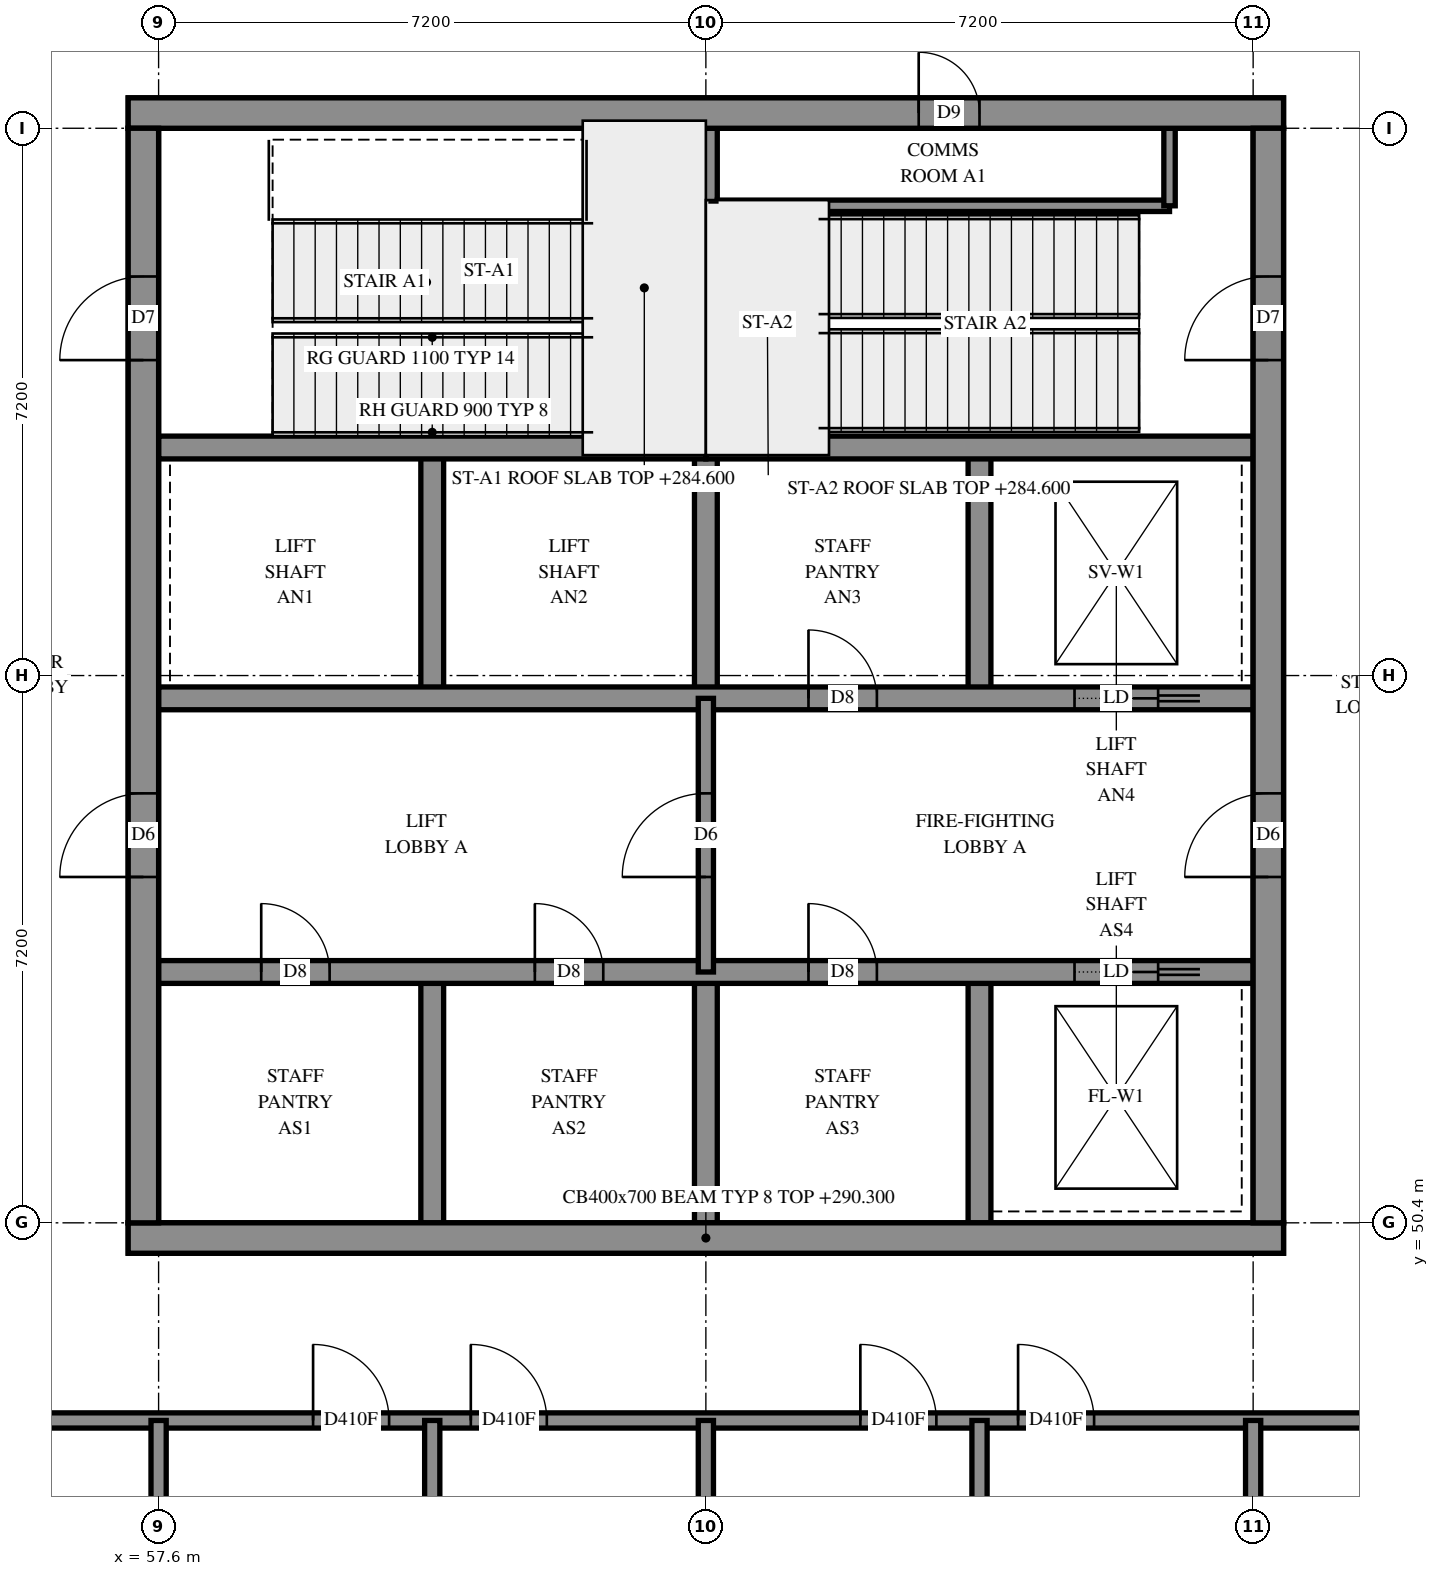
"""IFC4 building model, lengths in metres.
Left out: names, types, materials, properties, quantities, classifications, styles, units other than length and angle.
Written with IfcOpenShell. Run it as: python <this file> out.ifc"""

import sys

from ifc_helpers import new_model, si_unit, direction, frame, frame_2d, origin, place, context, subcontext, project, spatial, rectangle, extrude, element, fill, save


model = new_model("IFC4")
c1 = context("Model", 3, precision=1e-05, world=origin(), true_north=direction((0.0, 1.0)))
c2 = subcontext(c1, "Body", "Model", "MODEL_VIEW")
j1 = project(units=[si_unit("LENGTHUNIT", "METRE"), si_unit("PLANEANGLEUNIT", "RADIAN")], contexts=[c1])
p1 = place(None, origin())
s1 = spatial("IfcSite", under=j1, at=p1, CompositionType="ELEMENT")
p2 = place(p1, origin())
s2 = spatial("IfcBuilding", under=s1, at=p2, CompositionType="ELEMENT")
p3 = place(p2, frame((0.0, 0.0, 284.6)))
s3 = spatial("IfcBuildingStorey", under=s2, at=p3, CompositionType="ELEMENT", Elevation=284.6)
p4 = place(p3, frame((57.2, 50.2, -0.3), z_axis=(0.0, 0.0, 1.0), x_axis=(1.0, 0.0, 0.0)))
e1 = element("IfcWall", 1, at=p4, inside=s3, PredefinedType="SHEAR", context=c2, shape_type="SweptSolid", body=[
    extrude(rectangle(XDim=15.2, YDim=0.4, at=frame_2d((7.6, 0.0))), origin(), (0.0, 0.0, 1.0), 5.3),
])
p5 = place(p3, frame((57.2, 65.0, -0.3), z_axis=(0.0, 0.0, 1.0), x_axis=(1.0, 0.0, 0.0)))
e2 = element("IfcWall", 2, at=p5, inside=s3, PredefinedType="SHEAR", context=c2, shape_type="SweptSolid", body=[
    extrude(rectangle(XDim=15.2, YDim=0.4, at=frame_2d((7.6, 0.0))), origin(), (0.0, 0.0, 1.0), 5.3),
])
p6 = place(p5, frame((10.4, 0.0, 0.3)))
e3 = element("IfcOpeningElement", 3, at=p6, cuts=e2, PredefinedType="OPENING", context=c2, shape_type="SweptSolid", body=[
    extrude(rectangle(XDim=0.8, YDim=2.1, at=frame_2d((0.4, 1.05))), frame((0.0, 0.21, 0.0), z_axis=(0.0, -1.0, 0.0), x_axis=(1.0, 0.0, 0.0)), (0.0, 0.0, 1.0), 0.42),
])
p7 = place(p3, frame((57.4, 50.4, -0.3), z_axis=(0.0, 0.0, 1.0), x_axis=(0.0, 1.0, 0.0)))
e4 = element("IfcWall", 4, at=p7, inside=s3, PredefinedType="SHEAR", context=c2, shape_type="SweptSolid", body=[
    extrude(rectangle(XDim=14.4, YDim=0.4, at=frame_2d((7.2, 0.0))), origin(), (0.0, 0.0, 1.0), 5.3),
])
p8 = place(p7, frame((4.55, 0.0, 0.3)))
e5 = element("IfcOpeningElement", 5, at=p8, cuts=e4, PredefinedType="OPENING", context=c2, shape_type="SweptSolid", body=[
    extrude(rectangle(XDim=1.1, YDim=2.1, at=frame_2d((0.55, 1.05))), frame((0.0, 0.21, 0.0), z_axis=(0.0, -1.0, 0.0), x_axis=(1.0, 0.0, 0.0)), (0.0, 0.0, 1.0), 0.42),
])
p9 = place(p7, frame((11.35, 0.0, 0.3)))
e6 = element("IfcOpeningElement", 6, at=p9, cuts=e4, PredefinedType="OPENING", context=c2, shape_type="SweptSolid", body=[
    extrude(rectangle(XDim=1.1, YDim=2.1, at=frame_2d((0.55, 1.05))), frame((0.0, 0.21, 0.0), z_axis=(0.0, -1.0, 0.0), x_axis=(1.0, 0.0, 0.0)), (0.0, 0.0, 1.0), 0.42),
])
p10 = place(p3, frame((72.2, 50.4, -0.3), z_axis=(0.0, 0.0, 1.0), x_axis=(0.0, 1.0, 0.0)))
e7 = element("IfcWall", 7, at=p10, inside=s3, PredefinedType="SHEAR", context=c2, shape_type="SweptSolid", body=[
    extrude(rectangle(XDim=14.4, YDim=0.4, at=frame_2d((7.2, 0.0))), origin(), (0.0, 0.0, 1.0), 5.3),
])
p11 = place(p10, frame((4.55, 0.0, 0.3)))
e8 = element("IfcOpeningElement", 8, at=p11, cuts=e7, PredefinedType="OPENING", context=c2, shape_type="SweptSolid", body=[
    extrude(rectangle(XDim=1.1, YDim=2.1, at=frame_2d((0.55, 1.05))), frame((0.0, 0.21, 0.0), z_axis=(0.0, -1.0, 0.0), x_axis=(1.0, 0.0, 0.0)), (0.0, 0.0, 1.0), 0.42),
])
p12 = place(p10, frame((11.35, 0.0, 0.3)))
e9 = element("IfcOpeningElement", 9, at=p12, cuts=e7, PredefinedType="OPENING", context=c2, shape_type="SweptSolid", body=[
    extrude(rectangle(XDim=1.1, YDim=2.1, at=frame_2d((0.55, 1.05))), frame((0.0, 0.21, 0.0), z_axis=(0.0, -1.0, 0.0), x_axis=(1.0, 0.0, 0.0)), (0.0, 0.0, 1.0), 0.42),
])
for number, where, z_axis, x_axis in (
    (10, (61.2, 50.4, 0.0), (0.0, 0.0, 1.0), (0.0, 1.0, 0.0)),
    (11, (61.2, 57.3, 0.0), (0.0, 0.0, 1.0), (0.0, 1.0, 0.0)),
    (12, (64.8, 50.4, 0.0), (0.0, 0.0, 1.0), (0.0, 1.0, 0.0)),
    (13, (64.8, 57.3, 0.0), (0.0, 0.0, 1.0), (0.0, 1.0, 0.0)),
    (14, (68.4, 50.4, 0.0), (0.0, 0.0, 1.0), (0.0, 1.0, 0.0)),
    (15, (68.4, 57.3, 0.0), (0.0, 0.0, 1.0), (0.0, 1.0, 0.0)),
):
    element("IfcWall", number, at=place(p3, frame(where, z_axis=z_axis, x_axis=x_axis)), inside=s3, PredefinedType="SOLIDWALL", context=c2, shape_type="SweptSolid", body=[
        extrude(rectangle(XDim=3.3, YDim=0.3, at=frame_2d((1.65, 0.0))), origin(), (0.0, 0.0, 1.0), 5.7),
    ])
p13 = place(p3, frame((57.6, 53.7, 0.0), z_axis=(0.0, 0.0, 1.0), x_axis=(1.0, 0.0, 0.0)))
e16 = element("IfcWall", 16, at=p13, inside=s3, PredefinedType="SOLIDWALL", context=c2, shape_type="SweptSolid", body=[
    extrude(rectangle(XDim=14.4, YDim=0.3, at=frame_2d((7.2, 0.0))), origin(), (0.0, 0.0, 1.0), 5.7),
])
p14 = place(p13, frame((1.35, 0.0, 0.0)))
e17 = element("IfcOpeningElement", 17, at=p14, cuts=e16, PredefinedType="OPENING", context=c2, shape_type="SweptSolid", body=[
    extrude(rectangle(XDim=0.9, YDim=2.1, at=frame_2d((0.45, 1.05))), frame((0.0, 0.16, 0.0), z_axis=(0.0, -1.0, 0.0), x_axis=(1.0, 0.0, 0.0)), (0.0, 0.0, 1.0), 0.32),
])
p15 = place(p13, frame((4.95, 0.0, 0.0)))
e18 = element("IfcOpeningElement", 18, at=p15, cuts=e16, PredefinedType="OPENING", context=c2, shape_type="SweptSolid", body=[
    extrude(rectangle(XDim=0.9, YDim=2.1, at=frame_2d((0.45, 1.05))), frame((0.0, 0.16, 0.0), z_axis=(0.0, -1.0, 0.0), x_axis=(1.0, 0.0, 0.0)), (0.0, 0.0, 1.0), 0.32),
])
p16 = place(p13, frame((8.55, 0.0, 0.0)))
e19 = element("IfcOpeningElement", 19, at=p16, cuts=e16, PredefinedType="OPENING", context=c2, shape_type="SweptSolid", body=[
    extrude(rectangle(XDim=0.9, YDim=2.1, at=frame_2d((0.45, 1.05))), frame((0.0, 0.16, 0.0), z_axis=(0.0, -1.0, 0.0), x_axis=(1.0, 0.0, 0.0)), (0.0, 0.0, 1.0), 0.32),
])
p17 = place(p13, frame((12.05, 0.0, 0.0)))
e20 = element("IfcOpeningElement", 20, at=p17, cuts=e16, PredefinedType="OPENING", context=c2, shape_type="SweptSolid", body=[
    extrude(rectangle(XDim=1.1, YDim=2.1, at=frame_2d((0.55, 1.05))), frame((0.0, 0.16, 0.0), z_axis=(0.0, -1.0, 0.0), x_axis=(1.0, 0.0, 0.0)), (0.0, 0.0, 1.0), 0.32),
])
p18 = place(p3, frame((57.6, 57.3, 0.0), z_axis=(0.0, 0.0, 1.0), x_axis=(1.0, 0.0, 0.0)))
e21 = element("IfcWall", 21, at=p18, inside=s3, PredefinedType="SOLIDWALL", context=c2, shape_type="SweptSolid", body=[
    extrude(rectangle(XDim=14.4, YDim=0.3, at=frame_2d((7.2, 0.0))), origin(), (0.0, 0.0, 1.0), 5.7),
])
p19 = place(p18, frame((8.55, 0.0, 0.0)))
e22 = element("IfcOpeningElement", 22, at=p19, cuts=e21, PredefinedType="OPENING", context=c2, shape_type="SweptSolid", body=[
    extrude(rectangle(XDim=0.9, YDim=2.1, at=frame_2d((0.45, 1.05))), frame((0.0, 0.16, 0.0), z_axis=(0.0, -1.0, 0.0), x_axis=(1.0, 0.0, 0.0)), (0.0, 0.0, 1.0), 0.32),
])
p20 = place(p18, frame((12.05, 0.0, 0.0)))
e23 = element("IfcOpeningElement", 23, at=p20, cuts=e21, PredefinedType="OPENING", context=c2, shape_type="SweptSolid", body=[
    extrude(rectangle(XDim=1.1, YDim=2.1, at=frame_2d((0.55, 1.05))), frame((0.0, 0.16, 0.0), z_axis=(0.0, -1.0, 0.0), x_axis=(1.0, 0.0, 0.0)), (0.0, 0.0, 1.0), 0.32),
])
for number, where, z_axis, x_axis in (
    (24, (57.6, 60.6, 0.0), (0.0, 0.0, 1.0), (1.0, 0.0, 0.0)),
    (25, (64.8, 60.6, 0.0), (0.0, 0.0, 1.0), (1.0, 0.0, 0.0)),
):
    element("IfcWall", number, at=place(p3, frame(where, z_axis=z_axis, x_axis=x_axis)), inside=s3, PredefinedType="SOLIDWALL", context=c2, shape_type="SweptSolid", body=[
        extrude(rectangle(XDim=7.2, YDim=0.3, at=frame_2d((3.6, 0.0))), origin(), (0.0, 0.0, 1.0), 5.7),
    ])
p21 = place(p3, frame((64.8, 60.6, 0.0), z_axis=(0.0, 0.0, 1.0), x_axis=(0.0, 1.0, 0.0)))
e26 = element("IfcWall", 26, at=p21, inside=s3, PredefinedType="SOLIDWALL", context=c2, shape_type="SweptSolid", body=[
    extrude(rectangle(XDim=4.2, YDim=0.3, at=frame_2d((2.1, 0.0))), origin(), (0.0, 0.0, 1.0), 5.7),
])
p22 = place(p3, frame((64.95, 63.78, 0.0), z_axis=(0.0, 0.0, 1.0), x_axis=(1.0, 0.0, 0.0)))
e27 = element("IfcWall", 27, at=p22, inside=s3, PredefinedType="PARTITIONING", context=c2, shape_type="SweptSolid", body=[
    extrude(rectangle(XDim=5.95, YDim=0.15, at=frame_2d((2.975, 0.0))), origin(), (0.0, 0.0, 1.0), 5.7),
])
p23 = place(p3, frame((70.9, 63.78, 0.0), z_axis=(0.0, 0.0, 1.0), x_axis=(0.0, 1.0, 0.0)))
e28 = element("IfcWall", 28, at=p23, inside=s3, PredefinedType="PARTITIONING", context=c2, shape_type="SweptSolid", body=[
    extrude(rectangle(XDim=1.02, YDim=0.15, at=frame_2d((0.51, 0.0))), origin(), (0.0, 0.0, 1.0), 5.7),
])
p24 = place(p3, frame((64.8, 53.7, 0.0), z_axis=(0.0, 0.0, 1.0), x_axis=(0.0, 1.0, 0.0)))
e29 = element("IfcWall", 29, at=p24, inside=s3, PredefinedType="PARTITIONING", context=c2, shape_type="SweptSolid", body=[
    extrude(rectangle(XDim=3.6, YDim=0.2, at=frame_2d((1.8, 0.0))), origin(), (0.0, 0.0, 1.0), 5.7),
])
p25 = place(p24, frame((1.25, 0.0, 0.0)))
e30 = element("IfcOpeningElement", 30, at=p25, cuts=e29, PredefinedType="OPENING", context=c2, shape_type="SweptSolid", body=[
    extrude(rectangle(XDim=1.1, YDim=2.1, at=frame_2d((0.55, 1.05))), frame((0.0, 0.11, 0.0), z_axis=(0.0, -1.0, 0.0), x_axis=(1.0, 0.0, 0.0)), (0.0, 0.0, 1.0), 0.22),
])
p26 = place(p3, frame((55.0, 47.8, 0.0), z_axis=(0.0, 0.0, 1.0), x_axis=(1.0, 0.0, 0.0)))
e31 = element("IfcWall", 31, at=p26, inside=s3, PredefinedType="PARTITIONING", context=c2, shape_type="SweptSolid", body=[
    extrude(rectangle(XDim=19.266, YDim=0.2, at=frame_2d((9.633, 0.0))), origin(), (0.0, 0.0, 1.0), 5.7),
])
p27 = place(p26, frame((4.633, 0.0, 0.0)))
e32 = element("IfcOpeningElement", 32, at=p27, cuts=e31, PredefinedType="OPENING", context=c2, shape_type="SweptSolid", body=[
    extrude(rectangle(XDim=1.0, YDim=2.1, at=frame_2d((0.5, 1.05))), frame((0.0, 0.11, 0.0), z_axis=(0.0, -1.0, 0.0), x_axis=(1.0, 0.0, 0.0)), (0.0, 0.0, 1.0), 0.22),
])
p28 = place(p26, frame((6.707, 0.0, 0.0)))
e33 = element("IfcOpeningElement", 33, at=p28, cuts=e31, PredefinedType="OPENING", context=c2, shape_type="SweptSolid", body=[
    extrude(rectangle(XDim=1.0, YDim=2.1, at=frame_2d((0.5, 1.05))), frame((0.0, 0.11, 0.0), z_axis=(0.0, -1.0, 0.0), x_axis=(1.0, 0.0, 0.0)), (0.0, 0.0, 1.0), 0.22),
])
p29 = place(p26, frame((11.832, 0.0, 0.0)))
e34 = element("IfcOpeningElement", 34, at=p29, cuts=e31, PredefinedType="OPENING", context=c2, shape_type="SweptSolid", body=[
    extrude(rectangle(XDim=1.0, YDim=2.1, at=frame_2d((0.5, 1.05))), frame((0.0, 0.11, 0.0), z_axis=(0.0, -1.0, 0.0), x_axis=(1.0, 0.0, 0.0)), (0.0, 0.0, 1.0), 0.22),
])
p30 = place(p26, frame((13.908, 0.0, 0.0)))
e35 = element("IfcOpeningElement", 35, at=p30, cuts=e31, PredefinedType="OPENING", context=c2, shape_type="SweptSolid", body=[
    extrude(rectangle(XDim=1.0, YDim=2.1, at=frame_2d((0.5, 1.05))), frame((0.0, 0.11, 0.0), z_axis=(0.0, -1.0, 0.0), x_axis=(1.0, 0.0, 0.0)), (0.0, 0.0, 1.0), 0.22),
])
for number, where, z_axis, x_axis in (
    (36, (61.2, 42.13, 0.0), (0.0, 0.0, 1.0), (0.0, 1.0, 0.0)),
    (37, (68.4, 42.13, 0.0), (0.0, 0.0, 1.0), (0.0, 1.0, 0.0)),
):
    element("IfcWall", number, at=place(p3, frame(where, z_axis=z_axis, x_axis=x_axis)), inside=s3, PredefinedType="PARTITIONING", context=c2, shape_type="SweptSolid", body=[
        extrude(rectangle(XDim=5.67, YDim=0.2, at=frame_2d((2.835, 0.0))), origin(), (0.0, 0.0, 1.0), 5.7),
    ])
for number, where, z_axis, x_axis in (
    (38, (57.6, 42.85, 0.0), (0.0, 0.0, 1.0), (0.0, 1.0, 0.0)),
    (39, (64.8, 42.85, 0.0), (0.0, 0.0, 1.0), (0.0, 1.0, 0.0)),
    (40, (72.0, 42.85, 0.0), (0.0, 0.0, 1.0), (0.0, 1.0, 0.0)),
):
    element("IfcWall", number, at=place(p3, frame(where, z_axis=z_axis, x_axis=x_axis)), inside=s3, PredefinedType="PARTITIONING", context=c2, shape_type="SweptSolid", body=[
        extrude(rectangle(XDim=4.95, YDim=0.2, at=frame_2d((2.475, 0.0))), origin(), (0.0, 0.0, 1.0), 5.7),
    ])
p31 = place(p6, origin())
e41 = element("IfcDoor", 41, at=p31, inside=s3, OperationType="SINGLE_SWING_RIGHT", PredefinedType="DOOR", context=c2, shape_type="SweptSolid", body=[
    extrude(rectangle(XDim=0.8, YDim=2.1, at=frame_2d((0.4, 1.05))), frame((0.0, 0.025, 0.0), z_axis=(0.0, -1.0, 0.0), x_axis=(1.0, 0.0, 0.0)), (0.0, 0.0, 1.0), 0.05),
])
fill(e3, e41)
p32 = place(p8, origin())
e42 = element("IfcDoor", 42, at=p32, inside=s3, OperationType="DOUBLE_DOOR_SINGLE_SWING", PredefinedType="DOOR", context=c2, shape_type="SweptSolid", body=[
    extrude(rectangle(XDim=1.1, YDim=2.1, at=frame_2d((0.55, 1.05))), frame((0.0, 0.025, 0.0), z_axis=(0.0, -1.0, 0.0), x_axis=(1.0, 0.0, 0.0)), (0.0, 0.0, 1.0), 0.05),
])
fill(e5, e42)
p33 = place(p11, origin())
e43 = element("IfcDoor", 43, at=p33, inside=s3, OperationType="DOUBLE_DOOR_SINGLE_SWING", PredefinedType="DOOR", context=c2, shape_type="SweptSolid", body=[
    extrude(rectangle(XDim=1.1, YDim=2.1, at=frame_2d((0.55, 1.05))), frame((0.0, 0.025, 0.0), z_axis=(0.0, -1.0, 0.0), x_axis=(1.0, 0.0, 0.0)), (0.0, 0.0, 1.0), 0.05),
])
fill(e8, e43)
p34 = place(p9, origin())
e44 = element("IfcDoor", 44, at=p34, inside=s3, OperationType="SINGLE_SWING_LEFT", PredefinedType="DOOR", context=c2, shape_type="SweptSolid", body=[
    extrude(rectangle(XDim=1.1, YDim=2.1, at=frame_2d((0.55, 1.05))), frame((0.0, 0.025, 0.0), z_axis=(0.0, -1.0, 0.0), x_axis=(1.0, 0.0, 0.0)), (0.0, 0.0, 1.0), 0.05),
])
fill(e6, e44)
p35 = place(p12, origin())
e45 = element("IfcDoor", 45, at=p35, inside=s3, OperationType="SINGLE_SWING_RIGHT", PredefinedType="DOOR", context=c2, shape_type="SweptSolid", body=[
    extrude(rectangle(XDim=1.1, YDim=2.1, at=frame_2d((0.55, 1.05))), frame((0.0, 0.025, 0.0), z_axis=(0.0, -1.0, 0.0), x_axis=(1.0, 0.0, 0.0)), (0.0, 0.0, 1.0), 0.05),
])
fill(e9, e45)
p36 = place(p25, origin())
e46 = element("IfcDoor", 46, at=p36, inside=s3, OperationType="DOUBLE_DOOR_SINGLE_SWING", PredefinedType="DOOR", context=c2, shape_type="SweptSolid", body=[
    extrude(rectangle(XDim=1.1, YDim=2.1, at=frame_2d((0.55, 1.05))), frame((0.0, 0.025, 0.0), z_axis=(0.0, -1.0, 0.0), x_axis=(1.0, 0.0, 0.0)), (0.0, 0.0, 1.0), 0.05),
])
fill(e30, e46)
p37 = place(p14, origin())
e47 = element("IfcDoor", 47, at=p37, inside=s3, OperationType="SINGLE_SWING_LEFT", PredefinedType="DOOR", context=c2, shape_type="SweptSolid", body=[
    extrude(rectangle(XDim=0.9, YDim=2.1, at=frame_2d((0.45, 1.05))), frame((0.0, 0.025, 0.0), z_axis=(0.0, -1.0, 0.0), x_axis=(1.0, 0.0, 0.0)), (0.0, 0.0, 1.0), 0.05),
])
fill(e17, e47)
p38 = place(p15, origin())
e48 = element("IfcDoor", 48, at=p38, inside=s3, OperationType="SINGLE_SWING_LEFT", PredefinedType="DOOR", context=c2, shape_type="SweptSolid", body=[
    extrude(rectangle(XDim=0.9, YDim=2.1, at=frame_2d((0.45, 1.05))), frame((0.0, 0.025, 0.0), z_axis=(0.0, -1.0, 0.0), x_axis=(1.0, 0.0, 0.0)), (0.0, 0.0, 1.0), 0.05),
])
fill(e18, e48)
p39 = place(p16, origin())
e49 = element("IfcDoor", 49, at=p39, inside=s3, OperationType="SINGLE_SWING_LEFT", PredefinedType="DOOR", context=c2, shape_type="SweptSolid", body=[
    extrude(rectangle(XDim=0.9, YDim=2.1, at=frame_2d((0.45, 1.05))), frame((0.0, 0.025, 0.0), z_axis=(0.0, -1.0, 0.0), x_axis=(1.0, 0.0, 0.0)), (0.0, 0.0, 1.0), 0.05),
])
fill(e19, e49)
p40 = place(p19, origin())
e50 = element("IfcDoor", 50, at=p40, inside=s3, OperationType="SINGLE_SWING_LEFT", PredefinedType="DOOR", context=c2, shape_type="SweptSolid", body=[
    extrude(rectangle(XDim=0.9, YDim=2.1, at=frame_2d((0.45, 1.05))), frame((0.0, 0.025, 0.0), z_axis=(0.0, -1.0, 0.0), x_axis=(1.0, 0.0, 0.0)), (0.0, 0.0, 1.0), 0.05),
])
fill(e22, e50)
p41 = place(p17, origin())
e51 = element("IfcDoor", 51, at=p41, inside=s3, OperationType="SLIDING_TO_RIGHT", PredefinedType="DOOR", context=c2, shape_type="SweptSolid", body=[
    extrude(rectangle(XDim=1.1, YDim=2.1, at=frame_2d((0.55, 1.05))), frame((0.0, 0.025, 0.0), z_axis=(0.0, -1.0, 0.0), x_axis=(1.0, 0.0, 0.0)), (0.0, 0.0, 1.0), 0.05),
])
fill(e20, e51)
p42 = place(p20, origin())
e52 = element("IfcDoor", 52, at=p42, inside=s3, OperationType="SLIDING_TO_RIGHT", PredefinedType="DOOR", context=c2, shape_type="SweptSolid", body=[
    extrude(rectangle(XDim=1.1, YDim=2.1, at=frame_2d((0.55, 1.05))), frame((0.0, 0.025, 0.0), z_axis=(0.0, -1.0, 0.0), x_axis=(1.0, 0.0, 0.0)), (0.0, 0.0, 1.0), 0.05),
])
fill(e23, e52)
p43 = place(p27, origin())
e53 = element("IfcDoor", 53, at=p43, inside=s3, OperationType="SINGLE_SWING_LEFT", PredefinedType="DOOR", context=c2, shape_type="SweptSolid", body=[
    extrude(rectangle(XDim=1.0, YDim=2.1, at=frame_2d((0.5, 1.05))), frame((0.0, 0.025, 0.0), z_axis=(0.0, -1.0, 0.0), x_axis=(1.0, 0.0, 0.0)), (0.0, 0.0, 1.0), 0.05),
])
fill(e32, e53)
p44 = place(p28, origin())
e54 = element("IfcDoor", 54, at=p44, inside=s3, OperationType="SINGLE_SWING_RIGHT", PredefinedType="DOOR", context=c2, shape_type="SweptSolid", body=[
    extrude(rectangle(XDim=1.0, YDim=2.1, at=frame_2d((0.5, 1.05))), frame((0.0, 0.025, 0.0), z_axis=(0.0, -1.0, 0.0), x_axis=(1.0, 0.0, 0.0)), (0.0, 0.0, 1.0), 0.05),
])
fill(e33, e54)
p45 = place(p29, origin())
e55 = element("IfcDoor", 55, at=p45, inside=s3, OperationType="SINGLE_SWING_LEFT", PredefinedType="DOOR", context=c2, shape_type="SweptSolid", body=[
    extrude(rectangle(XDim=1.0, YDim=2.1, at=frame_2d((0.5, 1.05))), frame((0.0, 0.025, 0.0), z_axis=(0.0, -1.0, 0.0), x_axis=(1.0, 0.0, 0.0)), (0.0, 0.0, 1.0), 0.05),
])
fill(e34, e55)
p46 = place(p30, origin())
e56 = element("IfcDoor", 56, at=p46, inside=s3, OperationType="SINGLE_SWING_RIGHT", PredefinedType="DOOR", context=c2, shape_type="SweptSolid", body=[
    extrude(rectangle(XDim=1.0, YDim=2.1, at=frame_2d((0.5, 1.05))), frame((0.0, 0.025, 0.0), z_axis=(0.0, -1.0, 0.0), x_axis=(1.0, 0.0, 0.0)), (0.0, 0.0, 1.0), 0.05),
])
fill(e35, e56)
save(model, sys.argv[1])
